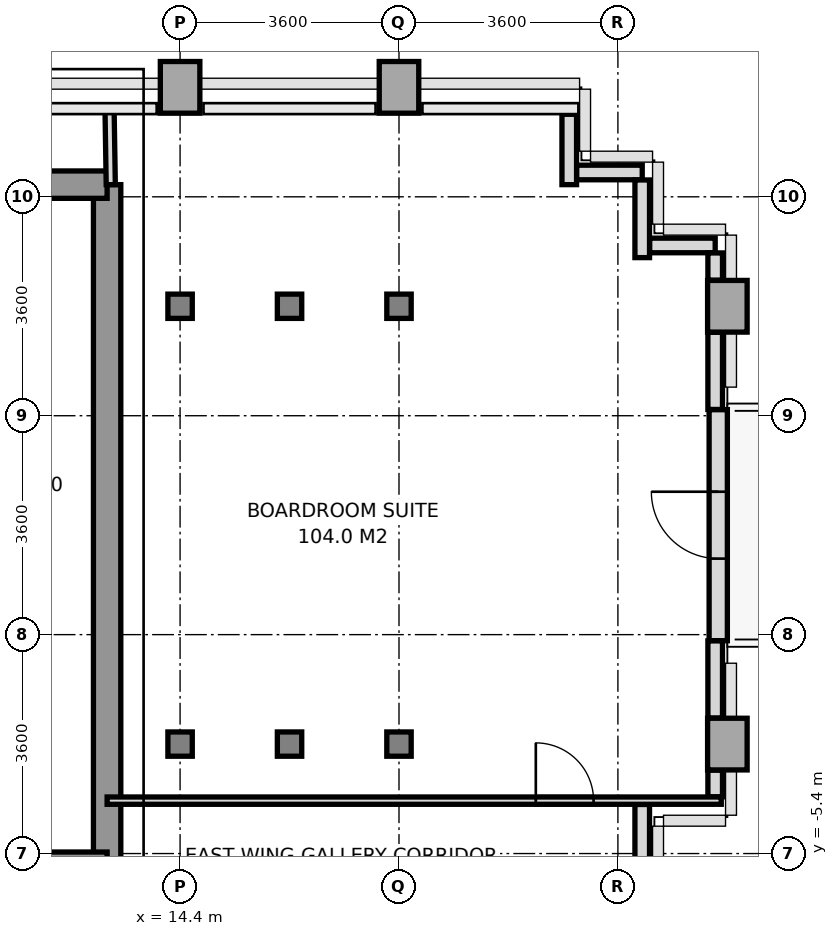
"""IFC4 building model, lengths in metres.
Left out: names, types, materials, properties, quantities, classifications, styles, units other than length and angle.
Written with IfcOpenShell. Run it as: python <this file> out.ifc"""

import sys

from ifc_helpers import new_model, si_unit, direction, frame, frame_2d, origin, origin_2d, place, context, subcontext, project, spatial, rectangle, i_section, extrude, source, transform, mapped, element, fill, save


model = new_model("IFC4")
c1 = context("Model", 3, precision=1e-05, world=origin(), true_north=direction((0.0, 1.0)))
c2 = subcontext(c1, "Body", "Model", "MODEL_VIEW")
j1 = project(units=[si_unit("LENGTHUNIT", "METRE"), si_unit("PLANEANGLEUNIT", "RADIAN")], contexts=[c1])
p1 = place(None, origin())
s1 = spatial("IfcSite", under=j1, at=p1, CompositionType="ELEMENT")
p2 = place(p1, origin())
s2 = spatial("IfcBuilding", under=s1, at=p2, CompositionType="ELEMENT")
p3 = place(p2, frame((0.0, 0.0, 100.6)))
s3 = spatial("IfcBuildingStorey", under=s2, at=p3, CompositionType="ELEMENT", Elevation=100.6)
m1 = source(origin(), c2, "Body", "SweptSolid", [
    extrude(i_section(OverallWidth=0.401, OverallDepth=0.399, WebThickness=0.02, FlangeThickness=0.032, at=origin_2d()), origin(), (0.0, 0.0, 1.0), 3.2),
])
for number, where, z_axis, x_axis in (
    (1, (14.4, -3.6, 0.0), (0.0, 0.0, 1.0), (1.0, 0.0, 0.0)),
    (2, (14.4, 3.6, 0.0), (0.0, 0.0, 1.0), (1.0, 0.0, 0.0)),
):
    element("IfcColumn", number, at=place(p3, frame(where, z_axis=z_axis, x_axis=x_axis)), inside=s3, PredefinedType="COLUMN", context=c2, shape_type="MappedRepresentation", body=[
        mapped(m1, transform((0.0, 0.0, 0.0), x_axis=(1.0, 0.0, 0.0), y_axis=(0.0, 1.0, 0.0), z_axis=(0.0, 0.0, 1.0), scale=1.0)),
    ])
m2 = source(origin(), c2, "Body", "SweptSolid", [
    extrude(rectangle(XDim=0.65, YDim=0.85, at=origin_2d()), origin(), (0.0, 0.0, 1.0), 3.2),
])
p4 = place(p3, frame((14.4, 7.2, 0.0), z_axis=(0.0, 0.0, 1.0), x_axis=(1.0, 0.0, 0.0)))
e3 = element("IfcColumn", 3, at=p4, inside=s3, PredefinedType="COLUMN", context=c2, shape_type="MappedRepresentation", body=[
    mapped(m2, transform((0.0, 0.0, 0.0), x_axis=(1.0, 0.0, 0.0), y_axis=(0.0, 1.0, 0.0), z_axis=(0.0, 0.0, 1.0), scale=1.0)),
])
for number, where, z_axis, x_axis in (
    (4, (16.2, -3.6, 0.0), (0.0, 0.0, 1.0), (1.0, 0.0, 0.0)),
    (5, (16.2, 3.6, 0.0), (0.0, 0.0, 1.0), (1.0, 0.0, 0.0)),
    (6, (18.0, -3.6, 0.0), (0.0, 0.0, 1.0), (1.0, 0.0, 0.0)),
    (7, (18.0, 3.6, 0.0), (0.0, 0.0, 1.0), (1.0, 0.0, 0.0)),
):
    element("IfcColumn", number, at=place(p3, frame(where, z_axis=z_axis, x_axis=x_axis)), inside=s3, PredefinedType="COLUMN", context=c2, shape_type="MappedRepresentation", body=[
        mapped(m1, transform((0.0, 0.0, 0.0), x_axis=(1.0, 0.0, 0.0), y_axis=(0.0, 1.0, 0.0), z_axis=(0.0, 0.0, 1.0), scale=1.0)),
    ])
for number, where, z_axis, x_axis in (
    (8, (18.0, 7.2, 0.0), (0.0, 0.0, 1.0), (1.0, 0.0, 0.0)),
    (9, (23.4, -3.6, 0.0), (0.0, 0.0, 1.0), (1.0, 0.0, 0.0)),
    (10, (23.4, 3.6, 0.0), (0.0, 0.0, 1.0), (1.0, 0.0, 0.0)),
):
    element("IfcColumn", number, at=place(p3, frame(where, z_axis=z_axis, x_axis=x_axis)), inside=s3, PredefinedType="COLUMN", context=c2, shape_type="MappedRepresentation", body=[
        mapped(m2, transform((0.0, 0.0, 0.0), x_axis=(1.0, 0.0, 0.0), y_axis=(0.0, 1.0, 0.0), z_axis=(0.0, 0.0, 1.0), scale=1.0)),
    ])
p5 = place(p3, frame((23.25, -1.9, 0.0), z_axis=(0.0, 0.0, 1.0), x_axis=(0.0, 1.0, 0.0)))
e11 = element("IfcWall", 11, at=p5, inside=s3, PredefinedType="SOLIDWALL", context=c2, shape_type="SweptSolid", body=[
    extrude(rectangle(XDim=3.8, YDim=0.3, at=frame_2d((1.9, 0.0))), origin(), (0.0, 0.0, 1.0), 2.45),
])
p6 = place(p5, frame((1.35, 0.0, 0.0)))
e12 = element("IfcOpeningElement", 12, at=p6, cuts=e11, PredefinedType="OPENING", context=c2, shape_type="SweptSolid", body=[
    extrude(rectangle(XDim=1.1, YDim=2.3, at=frame_2d((0.55, 1.15))), frame((0.0, 0.16, 0.0), z_axis=(0.0, -1.0, 0.0), x_axis=(1.0, 0.0, 0.0)), (0.0, 0.0, 1.0), 0.32),
])
p7 = place(p3, frame((22.0, -4.593, 0.0), z_axis=(0.0, 0.0, 1.0), x_axis=(0.0, -1.0, 0.0)))
e13 = element("IfcWall", 13, at=p7, inside=s3, PredefinedType="PARAPET", context=c2, shape_type="SweptSolid", body=[
    extrude(rectangle(XDim=1.207, YDim=0.24, at=frame_2d((0.604, 0.0))), origin(), (0.0, 0.0, 1.0), 1.15),
])
p8 = place(p3, frame((20.8, 6.757, 0.0), z_axis=(0.0, 0.0, 1.0), x_axis=(0.0, -1.0, 0.0)))
e14 = element("IfcWall", 14, at=p8, inside=s3, PredefinedType="PARAPET", context=c2, shape_type="SweptSolid", body=[
    extrude(rectangle(XDim=1.157, YDim=0.24, at=frame_2d((0.579, 0.0))), origin(), (0.0, 0.0, 1.0), 1.15),
])
p9 = place(p3, frame((20.923, 5.8, 0.0), z_axis=(0.0, 0.0, 1.0), x_axis=(1.0, 0.0, 0.0)))
e15 = element("IfcWall", 15, at=p9, inside=s3, PredefinedType="PARAPET", context=c2, shape_type="SweptSolid", body=[
    extrude(rectangle(XDim=1.077, YDim=0.24, at=frame_2d((0.539, 0.0))), origin(), (0.0, 0.0, 1.0), 1.15),
])
p10 = place(p3, frame((22.0, 5.677, 0.0), z_axis=(0.0, 0.0, 1.0), x_axis=(0.0, -1.0, 0.0)))
e16 = element("IfcWall", 16, at=p10, inside=s3, PredefinedType="PARAPET", context=c2, shape_type="SweptSolid", body=[
    extrude(rectangle(XDim=1.277, YDim=0.24, at=frame_2d((0.639, 0.0))), origin(), (0.0, 0.0, 1.0), 1.15),
])
p11 = place(p3, frame((22.123, 4.6, 0.0), z_axis=(0.0, 0.0, 1.0), x_axis=(1.0, 0.0, 0.0)))
e17 = element("IfcWall", 17, at=p11, inside=s3, PredefinedType="PARAPET", context=c2, shape_type="SweptSolid", body=[
    extrude(rectangle(XDim=1.077, YDim=0.24, at=frame_2d((0.539, 0.0))), origin(), (0.0, 0.0, 1.0), 1.15),
])
p12 = place(p3, frame((23.2, 4.477, 0.0), z_axis=(0.0, 0.0, 1.0), x_axis=(0.0, -1.0, 0.0)))
e18 = element("IfcWall", 18, at=p12, inside=s3, PredefinedType="PARAPET", context=c2, shape_type="SweptSolid", body=[
    extrude(rectangle(XDim=0.449, YDim=0.24, at=frame_2d((0.225, 0.0))), origin(), (0.0, 0.0, 1.0), 1.15),
])
for number, where, z_axis, x_axis in (
    (19, (23.2, 3.172, 0.0), (0.0, 0.0, 1.0), (0.0, -1.0, 0.0)),
    (20, (23.2, -1.903, 0.0), (0.0, 0.0, 1.0), (0.0, -1.0, 0.0)),
):
    element("IfcWall", number, at=place(p3, frame(where, z_axis=z_axis, x_axis=x_axis)), inside=s3, PredefinedType="PARAPET", context=c2, shape_type="SweptSolid", body=[
        extrude(rectangle(XDim=1.269, YDim=0.24, at=frame_2d((0.635, 0.0))), origin(), (0.0, 0.0, 1.0), 1.15),
    ])
p13 = place(p3, frame((23.2, -4.028, 0.0), z_axis=(0.0, 0.0, 1.0), x_axis=(0.0, -1.0, 0.0)))
e21 = element("IfcWall", 21, at=p13, inside=s3, PredefinedType="PARAPET", context=c2, shape_type="SweptSolid", body=[
    extrude(rectangle(XDim=0.439, YDim=0.24, at=frame_2d((0.219, 0.0))), origin(), (0.0, 0.0, 1.0), 1.15),
])
p14 = place(p3, frame((13.2, -5.6, 0.0), z_axis=(0.0, 0.0, 1.0), x_axis=(0.0, 1.0, 0.0)))
e22 = element("IfcWall", 22, at=p14, inside=s3, PredefinedType="SHEAR", context=c2, shape_type="SweptSolid", body=[
    extrude(rectangle(XDim=11.2, YDim=0.45, at=frame_2d((5.6, 0.0))), origin(), (0.0, 0.0, 1.0), 3.2),
])
p15 = place(p3, frame((11.381, 5.6, 0.0), z_axis=(0.0, 0.0, 1.0), x_axis=(1.0, 0.0, 0.0)))
e23 = element("IfcWall", 23, at=p15, inside=s3, PredefinedType="SHEAR", context=c2, shape_type="SweptSolid", body=[
    extrude(rectangle(XDim=1.819, YDim=0.45, at=frame_2d((0.909, 0.0))), origin(), (0.0, 0.0, 1.0), 3.2),
])
p16 = place(p3, frame((5.4, -5.6, 0.0), z_axis=(0.0, 0.0, 1.0), x_axis=(1.0, 0.0, 0.0)))
e24 = element("IfcWall", 24, at=p16, inside=s3, PredefinedType="SHEAR", context=c2, shape_type="SweptSolid", body=[
    extrude(rectangle(XDim=7.8, YDim=0.45, at=frame_2d((3.9, 0.0))), origin(), (0.0, 0.0, 1.0), 3.2),
])
p17 = place(p16, frame((3.0, 0.0, 0.0)))
e25 = element("IfcOpeningElement", 25, at=p17, cuts=e24, PredefinedType="OPENING", context=c2, shape_type="SweptSolid", body=[
    extrude(rectangle(XDim=1.2, YDim=2.2, at=frame_2d((0.6, 1.1))), frame((0.0, 0.235, 0.0), z_axis=(0.0, -1.0, 0.0), x_axis=(1.0, 0.0, 0.0)), (0.0, 0.0, 1.0), 0.47),
])
p18 = place(p3, frame((13.26, 5.6, 0.0), z_axis=(0.0, 0.0, 1.0), x_axis=(-0.016013571389, 0.999871774545, 0.0)))
e26 = element("IfcWall", 26, at=p18, inside=s3, PredefinedType="PARTITIONING", context=c2, shape_type="SweptSolid", body=[
    extrude(rectangle(XDim=1.25, YDim=0.15, at=frame_2d((0.625, 0.0))), origin(), (0.0, 0.0, 1.0), 3.2),
])
p19 = place(p3, frame((13.2, -4.53, 0.0), z_axis=(0.0, 0.0, 1.0), x_axis=(1.0, 0.0, 0.0)))
e27 = element("IfcWall", 27, at=p19, inside=s3, PredefinedType="PARTITIONING", context=c2, shape_type="SweptSolid", body=[
    extrude(rectangle(XDim=10.1, YDim=0.12, at=frame_2d((5.05, 0.0))), origin(), (0.0, 0.0, 1.0), 2.75),
])
p20 = place(p19, frame((7.05, 0.0, 0.0)))
e28 = element("IfcOpeningElement", 28, at=p20, cuts=e27, PredefinedType="OPENING", context=c2, shape_type="SweptSolid", body=[
    extrude(rectangle(XDim=0.95, YDim=2.15, at=frame_2d((0.475, 1.075))), frame((0.0, 0.07, 0.0), z_axis=(0.0, -1.0, 0.0), x_axis=(1.0, 0.0, 0.0)), (0.0, 0.0, 1.0), 0.14),
])
m3 = source(origin(), c2, "Body", "SweptSolid", [
    extrude(rectangle(XDim=1.1, YDim=2.3, at=frame_2d((0.55, 1.15))), frame((0.0, 0.025, 0.0), z_axis=(0.0, -1.0, 0.0), x_axis=(1.0, 0.0, 0.0)), (0.0, 0.0, 1.0), 0.05),
])
p21 = place(p6, frame((1.1, 0.0, 0.0), z_axis=(0.0, 0.0, 1.0), x_axis=(-1.0, 0.0, 0.0)))
e29 = element("IfcDoor", 29, at=p21, inside=s3, OperationType="SINGLE_SWING_RIGHT", PredefinedType="DOOR", context=c2, shape_type="MappedRepresentation", body=[
    mapped(m3, transform((0.0, 0.0, 0.0), x_axis=(1.0, 0.0, 0.0), y_axis=(0.0, 1.0, 0.0), z_axis=(0.0, 0.0, 1.0), scale=1.0)),
])
fill(e12, e29)
m4 = source(origin(), c2, "Body", "SweptSolid", [
    extrude(rectangle(XDim=0.95, YDim=2.15, at=frame_2d((0.475, 1.075))), frame((0.0, 0.025, 0.0), z_axis=(0.0, -1.0, 0.0), x_axis=(1.0, 0.0, 0.0)), (0.0, 0.0, 1.0), 0.05),
])
p22 = place(p20, origin())
e30 = element("IfcDoor", 30, at=p22, inside=s3, OperationType="SINGLE_SWING_LEFT", PredefinedType="DOOR", context=c2, shape_type="MappedRepresentation", body=[
    mapped(m4, transform((0.0, 0.0, 0.0), x_axis=(1.0, 0.0, 0.0), y_axis=(0.0, 1.0, 0.0), z_axis=(0.0, 0.0, 1.0), scale=1.0)),
])
fill(e28, e30)
save(model, sys.argv[1])
